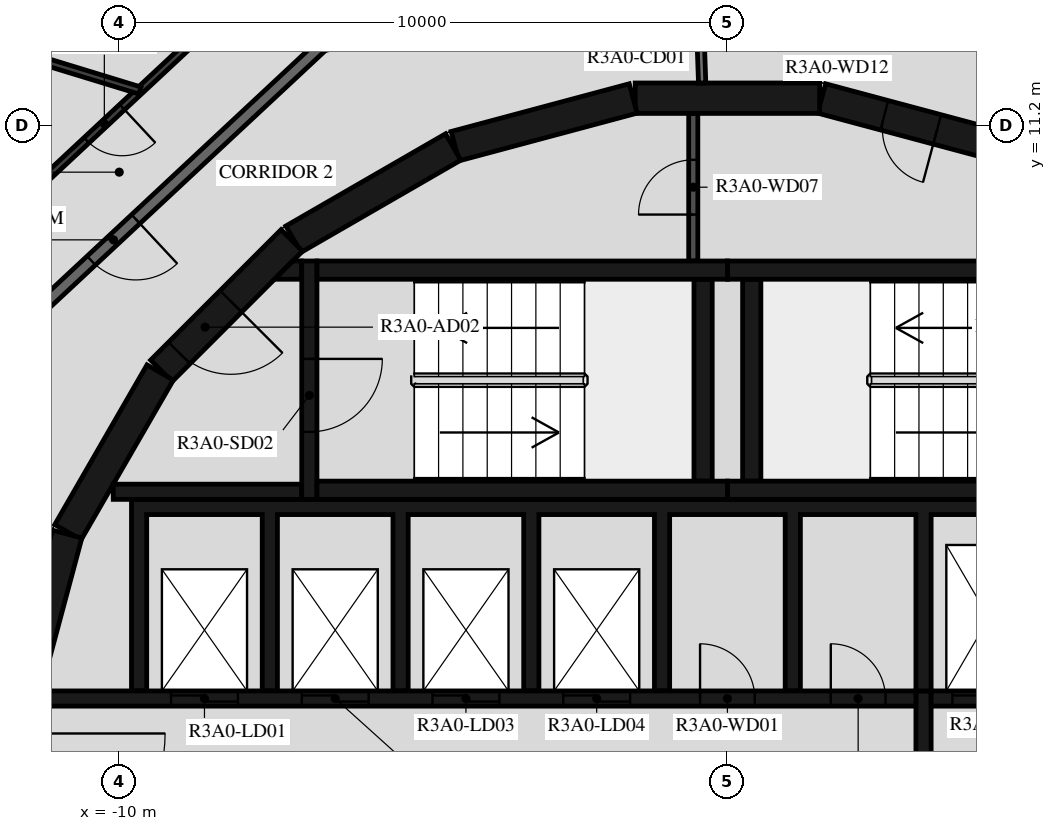
"""IFC4 building model, lengths in metres.
Left out: names, types, materials, properties, quantities, classifications, styles, units other than length and angle.
Written with IfcOpenShell. Run it as: python <this file> out.ifc"""

import sys

from ifc_helpers import new_model, si_unit, direction, frame, frame_2d, origin, place, context, subcontext, project, spatial, polyline, rectangle, outline, extrude, element, fill, save


model = new_model("IFC4")
c1 = context("Model", 3, precision=1e-05, world=origin(), true_north=direction((0.0, 1.0)))
c2 = subcontext(c1, "Body", "Model", "MODEL_VIEW")
j1 = project(units=[si_unit("LENGTHUNIT", "METRE"), si_unit("PLANEANGLEUNIT", "RADIAN")], contexts=[c1])
p1 = place(None, origin())
s1 = spatial("IfcSite", under=j1, at=p1, CompositionType="ELEMENT")
p2 = place(p1, origin())
s2 = spatial("IfcBuilding", under=s1, at=p2, CompositionType="ELEMENT")
p3 = place(p2, frame((0.0, 0.0, 113.4)))
s3 = spatial("IfcBuildingStorey", under=s2, at=p3, CompositionType="ELEMENT", Elevation=113.4)
p4 = place(p3, frame((4.479, 10.858, 0.0), z_axis=(0.0, 0.0, 1.0), x_axis=(-0.965948410781, 0.258734743916, 0.0)))
e1 = element("IfcWall", 1, at=p4, inside=s3, PredefinedType="SHEAR", context=c2, shape_type="SweptSolid", body=[
    extrude(rectangle(XDim=3.033, YDim=0.5, at=frame_2d((1.516, 0.0))), origin(), (0.0, 0.0, 1.0), 3.12),
])
p5 = place(p4, frame((1.066, 0.0, 0.0)))
e2 = element("IfcOpeningElement", 2, at=p5, cuts=e1, PredefinedType="OPENING", context=c2, shape_type="SweptSolid", body=[
    extrude(rectangle(XDim=0.9, YDim=2.1, at=frame_2d((0.45, 1.05))), frame((0.0, 0.26, 0.0), z_axis=(0.0, -1.0, 0.0), x_axis=(1.0, 0.0, 0.0)), (0.0, 0.0, 1.0), 0.52),
])
for number, where, z_axis, x_axis in (
    (3, (1.516, 11.647, 0.0), (0.0, 0.0, 1.0), (-1.0, 0.0, 0.0)),
    (4, (-1.55, 11.643, 0.0), (0.0, 0.0, 1.0), (-0.966, -0.259, 0.0)),
    (5, (-4.51, 10.845, 0.0), (0.0, 0.0, 1.0), (-0.866, -0.5, 0.0)),
):
    element("IfcWall", number, at=place(p3, frame(where, z_axis=z_axis, x_axis=x_axis)), inside=s3, PredefinedType="SHEAR", context=c2, shape_type="SweptSolid", body=[
        extrude(rectangle(XDim=3.033, YDim=0.5, at=frame_2d((1.516, 0.0))), origin(), (0.0, 0.0, 1.0), 3.12),
    ])
p6 = place(p3, frame((-7.164, 9.308, 0.0), z_axis=(0.0, 0.0, 1.0), x_axis=(-0.707106781187, -0.707106781187, 0.0)))
e6 = element("IfcWall", 6, at=p6, inside=s3, PredefinedType="SHEAR", context=c2, shape_type="SweptSolid", body=[
    extrude(rectangle(XDim=3.032, YDim=0.5, at=frame_2d((1.516, 0.0))), origin(), (0.0, 0.0, 1.0), 3.12),
])
p7 = place(p6, frame((1.416, 0.0, 0.0)))
e7 = element("IfcOpeningElement", 7, at=p7, cuts=e6, PredefinedType="OPENING", context=c2, shape_type="SweptSolid", body=[
    extrude(rectangle(XDim=1.2, YDim=2.1, at=frame_2d((0.6, 1.05))), frame((0.0, 0.26, 0.0), z_axis=(0.0, -1.0, 0.0), x_axis=(1.0, 0.0, 0.0)), (0.0, 0.0, 1.0), 0.52),
])
for number, where, z_axis, x_axis in (
    (8, (-9.329, 7.137, 0.0), (0.0, 0.0, 1.0), (-0.5, -0.866, 0.0)),
    (9, (-10.858, 4.479, 0.0), (0.0, 0.0, 1.0), (-0.259, -0.966, 0.0)),
):
    element("IfcWall", number, at=place(p3, frame(where, z_axis=z_axis, x_axis=x_axis)), inside=s3, PredefinedType="SHEAR", context=c2, shape_type="SweptSolid", body=[
        extrude(rectangle(XDim=3.033, YDim=0.5, at=frame_2d((1.516, 0.0))), origin(), (0.0, 0.0, 1.0), 3.12),
    ])
for number, where, z_axis, x_axis in (
    (10, (0.0, 5.2, 0.0), (0.0, 0.0, 1.0), (1.0, 0.0, 0.0)),
    (11, (0.0, 8.82, 0.0), (0.0, 0.0, 1.0), (1.0, 0.0, 0.0)),
):
    element("IfcWall", number, at=place(p3, frame(where, z_axis=z_axis, x_axis=x_axis)), inside=s3, PredefinedType="SHEAR", context=c2, shape_type="SweptSolid", body=[
        extrude(rectangle(XDim=6.75, YDim=0.3, at=frame_2d((3.375, 0.0))), origin(), (0.0, 0.0, 1.0), 3.12),
    ])
p8 = place(p3, frame((0.4, 5.35, 0.0), z_axis=(0.0, 0.0, 1.0), x_axis=(0.0, 1.0, 0.0)))
e12 = element("IfcWall", 12, at=p8, inside=s3, PredefinedType="SHEAR", context=c2, shape_type="SweptSolid", body=[
    extrude(rectangle(XDim=3.32, YDim=0.3, at=frame_2d((1.66, 0.0))), origin(), (0.0, 0.0, 1.0), 3.12),
])
for number, where, z_axis, x_axis in (
    (13, (-6.75, 5.2, 0.0), (0.0, 0.0, 1.0), (1.0, 0.0, 0.0)),
    (14, (-6.75, 8.82, 0.0), (0.0, 0.0, 1.0), (1.0, 0.0, 0.0)),
):
    element("IfcWall", number, at=place(p3, frame(where, z_axis=z_axis, x_axis=x_axis)), inside=s3, PredefinedType="SHEAR", context=c2, shape_type="SweptSolid", body=[
        extrude(rectangle(XDim=6.75, YDim=0.3, at=frame_2d((3.375, 0.0))), origin(), (0.0, 0.0, 1.0), 3.12),
    ])
p9 = place(p3, frame((-0.4, 5.35, 0.0), z_axis=(0.0, 0.0, 1.0), x_axis=(0.0, 1.0, 0.0)))
e15 = element("IfcWall", 15, at=p9, inside=s3, PredefinedType="SHEAR", context=c2, shape_type="SweptSolid", body=[
    extrude(rectangle(XDim=3.32, YDim=0.3, at=frame_2d((1.66, 0.0))), origin(), (0.0, 0.0, 1.0), 3.12),
])
p10 = place(p3, frame((-6.875, 8.97, 0.0), z_axis=(0.0, 0.0, 1.0), x_axis=(0.0, -1.0, 0.0)))
e16 = element("IfcWall", 16, at=p10, inside=s3, PredefinedType="SHEAR", context=c2, shape_type="SweptSolid", body=[
    extrude(rectangle(XDim=3.92, YDim=0.25, at=frame_2d((1.96, 0.0))), origin(), (0.0, 0.0, 1.0), 3.12),
])
p11 = place(p10, frame((1.61, 0.0, 0.0)))
e17 = element("IfcOpeningElement", 17, at=p11, cuts=e16, PredefinedType="OPENING", context=c2, shape_type="SweptSolid", body=[
    extrude(rectangle(XDim=1.2, YDim=2.1, at=frame_2d((0.6, 1.05))), frame((0.0, 0.135, 0.0), z_axis=(0.0, -1.0, 0.0), x_axis=(1.0, 0.0, 0.0)), (0.0, 0.0, 1.0), 0.27),
])
p12 = place(p3, frame((-7.0, 5.175, 0.0), z_axis=(0.0, 0.0, 1.0), x_axis=(-1.0, 0.0, 0.0)))
e18 = element("IfcWall", 18, at=p12, inside=s3, PredefinedType="SHEAR", context=c2, shape_type="SweptSolid", body=[
    extrude(rectangle(XDim=3.1, YDim=0.25, at=frame_2d((1.55, 0.0))), origin(), (0.0, 0.0, 1.0), 3.12),
])
p13 = place(p3, origin())
e19 = element("IfcWall", 19, at=p13, inside=s3, PredefinedType="SHEAR", context=c2, shape_type="SweptSolid", body=[
    extrude(outline(polyline([(-7.148, 8.97), (-7.0, 8.97), (-7.0, 8.67), (-7.448, 8.67), (-7.148, 8.97)])), origin(), (0.0, 0.0, 1.0), 3.12),
])
p14 = place(p3, origin())
e20 = element("IfcWall", 20, at=p14, inside=s3, PredefinedType="SHEAR", context=c2, shape_type="SweptSolid", body=[
    extrude(outline(polyline([(-9.55, 4.8), (-7.65, 4.8), (-7.65, 1.9), (-7.4, 1.9), (-7.4, 4.8), (-5.5, 4.8), (-5.5, 1.9), (-5.25, 1.9), (-5.25, 4.8), (-3.35, 4.8), (-3.35, 1.9), (-3.1, 1.9), (-3.1, 4.8), (-1.2, 4.8), (-1.2, 1.9), (-0.95, 1.9), (-0.95, 4.8), (0.95, 4.8), (0.95, 1.9), (1.2, 1.9), (1.2, 4.8), (3.1, 4.8), (3.1, 1.9), (3.35, 1.9), (3.35, 4.8), (5.25, 4.8), (5.25, 1.9), (5.5, 1.9), (5.5, 4.8), (7.4, 4.8), (7.4, 1.9), (7.65, 1.9), (7.65, 4.8), (9.55, 4.8), (9.55, 1.9), (9.8, 1.9), (9.8, 4.8), (9.8, 5.05), (-9.8, 5.05), (-9.8, 4.8), (-9.8, 1.9), (-9.55, 1.9), (-9.55, 4.8)])), origin(), (0.0, 0.0, 1.0), 3.12),
])
p15 = place(p3, frame((-11.28, 1.775, 0.0), z_axis=(0.0, 0.0, 1.0), x_axis=(1.0, 0.0, 0.0)))
e21 = element("IfcWall", 21, at=p15, inside=s3, PredefinedType="SHEAR", context=c2, shape_type="SweptSolid", body=[
    extrude(rectangle(XDim=14.38, YDim=0.25, at=frame_2d((7.19, 0.0))), origin(), (0.0, 0.0, 1.0), 3.12),
])
p16 = place(p15, frame((2.13, 0.0, 0.0)))
e22 = element("IfcOpeningElement", 22, at=p16, cuts=e21, PredefinedType="OPENING", context=c2, shape_type="SweptSolid", body=[
    extrude(rectangle(XDim=1.1, YDim=2.1, at=frame_2d((0.55, 1.05))), frame((0.0, 0.135, 0.0), z_axis=(0.0, -1.0, 0.0), x_axis=(1.0, 0.0, 0.0)), (0.0, 0.0, 1.0), 0.27),
])
p17 = place(p15, frame((4.28, 0.0, 0.0)))
e23 = element("IfcOpeningElement", 23, at=p17, cuts=e21, PredefinedType="OPENING", context=c2, shape_type="SweptSolid", body=[
    extrude(rectangle(XDim=1.1, YDim=2.1, at=frame_2d((0.55, 1.05))), frame((0.0, 0.135, 0.0), z_axis=(0.0, -1.0, 0.0), x_axis=(1.0, 0.0, 0.0)), (0.0, 0.0, 1.0), 0.27),
])
p18 = place(p15, frame((6.43, 0.0, 0.0)))
e24 = element("IfcOpeningElement", 24, at=p18, cuts=e21, PredefinedType="OPENING", context=c2, shape_type="SweptSolid", body=[
    extrude(rectangle(XDim=1.1, YDim=2.1, at=frame_2d((0.55, 1.05))), frame((0.0, 0.135, 0.0), z_axis=(0.0, -1.0, 0.0), x_axis=(1.0, 0.0, 0.0)), (0.0, 0.0, 1.0), 0.27),
])
p19 = place(p15, frame((8.58, 0.0, 0.0)))
e25 = element("IfcOpeningElement", 25, at=p19, cuts=e21, PredefinedType="OPENING", context=c2, shape_type="SweptSolid", body=[
    extrude(rectangle(XDim=1.1, YDim=2.1, at=frame_2d((0.55, 1.05))), frame((0.0, 0.135, 0.0), z_axis=(0.0, -1.0, 0.0), x_axis=(1.0, 0.0, 0.0)), (0.0, 0.0, 1.0), 0.27),
])
p20 = place(p15, frame((10.83, 0.0, 0.0)))
e26 = element("IfcOpeningElement", 26, at=p20, cuts=e21, PredefinedType="OPENING", context=c2, shape_type="SweptSolid", body=[
    extrude(rectangle(XDim=0.9, YDim=2.1, at=frame_2d((0.45, 1.05))), frame((0.0, 0.135, 0.0), z_axis=(0.0, -1.0, 0.0), x_axis=(1.0, 0.0, 0.0)), (0.0, 0.0, 1.0), 0.27),
])
p21 = place(p15, frame((12.98, 0.0, 0.0)))
e27 = element("IfcOpeningElement", 27, at=p21, cuts=e21, PredefinedType="OPENING", context=c2, shape_type="SweptSolid", body=[
    extrude(rectangle(XDim=0.9, YDim=2.1, at=frame_2d((0.45, 1.05))), frame((0.0, 0.135, 0.0), z_axis=(0.0, -1.0, 0.0), x_axis=(1.0, 0.0, 0.0)), (0.0, 0.0, 1.0), 0.27),
])
p22 = place(p3, frame((3.35, 1.775, 0.0), z_axis=(0.0, 0.0, 1.0), x_axis=(1.0, 0.0, 0.0)))
e28 = element("IfcWall", 28, at=p22, inside=s3, PredefinedType="SHEAR", context=c2, shape_type="SweptSolid", body=[
    extrude(rectangle(XDim=7.93, YDim=0.25, at=frame_2d((3.965, 0.0))), origin(), (0.0, 0.0, 1.0), 3.12),
])
p23 = place(p22, frame((0.35, 0.0, 0.0)))
e29 = element("IfcOpeningElement", 29, at=p23, cuts=e28, PredefinedType="OPENING", context=c2, shape_type="SweptSolid", body=[
    extrude(rectangle(XDim=1.2, YDim=2.4, at=frame_2d((0.6, 1.2))), frame((0.0, 0.135, 0.0), z_axis=(0.0, -1.0, 0.0), x_axis=(1.0, 0.0, 0.0)), (0.0, 0.0, 1.0), 0.27),
])
p24 = place(p22, frame((2.5, 0.0, 0.0)))
e30 = element("IfcOpeningElement", 30, at=p24, cuts=e28, PredefinedType="OPENING", context=c2, shape_type="SweptSolid", body=[
    extrude(rectangle(XDim=1.2, YDim=2.4, at=frame_2d((0.6, 1.2))), frame((0.0, 0.135, 0.0), z_axis=(0.0, -1.0, 0.0), x_axis=(1.0, 0.0, 0.0)), (0.0, 0.0, 1.0), 0.27),
])
p25 = place(p22, frame((4.8, 0.0, 0.0)))
e31 = element("IfcOpeningElement", 31, at=p25, cuts=e28, PredefinedType="OPENING", context=c2, shape_type="SweptSolid", body=[
    extrude(rectangle(XDim=0.9, YDim=2.1, at=frame_2d((0.45, 1.05))), frame((0.0, 0.135, 0.0), z_axis=(0.0, -1.0, 0.0), x_axis=(1.0, 0.0, 0.0)), (0.0, 0.0, 1.0), 0.27),
])
p26 = place(p3, frame((3.225, -1.9, 0.0), z_axis=(0.0, 0.0, 1.0), x_axis=(0.0, 1.0, 0.0)))
e32 = element("IfcWall", 32, at=p26, inside=s3, PredefinedType="SHEAR", context=c2, shape_type="SweptSolid", body=[
    extrude(rectangle(XDim=3.8, YDim=0.25, at=frame_2d((1.9, 0.0))), origin(), (0.0, 0.0, 1.0), 3.12),
])
p27 = place(p3, frame((-0.562, 8.97, 0.0), z_axis=(0.0, 0.0, 1.0), x_axis=(0.0, 1.0, 0.0)))
e33 = element("IfcWall", 33, at=p27, inside=s3, PredefinedType="PARTITIONING", context=c2, shape_type="SweptSolid", body=[
    extrude(rectangle(XDim=2.427, YDim=0.15, at=frame_2d((1.214, 0.0))), origin(), (0.0, 0.0, 1.0), 3.12),
])
p28 = place(p27, frame((0.764, 0.0, 0.0)))
e34 = element("IfcOpeningElement", 34, at=p28, cuts=e33, PredefinedType="OPENING", context=c2, shape_type="SweptSolid", body=[
    extrude(rectangle(XDim=0.9, YDim=2.1, at=frame_2d((0.45, 1.05))), frame((0.0, 0.085, 0.0), z_axis=(0.0, -1.0, 0.0), x_axis=(1.0, 0.0, 0.0)), (0.0, 0.0, 1.0), 0.17),
])
p29 = place(p3, frame((-0.487, 13.948, 0.0), z_axis=(0.0, 0.0, 1.0), x_axis=(0.034859752231, -0.999392214135, 0.0)))
e35 = element("IfcWall", 35, at=p29, inside=s3, PredefinedType="PARTITIONING", context=c2, shape_type="SweptSolid", body=[
    extrude(rectangle(XDim=2.052, YDim=0.12, at=frame_2d((1.026, 0.0))), origin(), (0.0, 0.0, 1.0), 3.12),
])
p30 = place(p29, frame((0.125, 0.0, 0.0)))
e36 = element("IfcOpeningElement", 36, at=p30, cuts=e35, PredefinedType="OPENING", context=c2, shape_type="SweptSolid", body=[
    extrude(rectangle(XDim=1.2, YDim=2.1, at=frame_2d((0.6, 1.05))), frame((0.0, 0.07, 0.0), z_axis=(0.0, -1.0, 0.0), x_axis=(1.0, 0.0, 0.0)), (0.0, 0.0, 1.0), 0.14),
])
p31 = place(p3, frame((7.516, 12.028, 0.0), z_axis=(0.0, 0.0, 1.0), x_axis=(-0.956306642771, 0.292365533182, 0.0)))
e37 = element("IfcWall", 37, at=p31, inside=s3, PredefinedType="STANDARD", context=c2, shape_type="SweptSolid", body=[
    extrude(rectangle(XDim=7.342, YDim=0.2, at=frame_2d((3.671, 0.0))), origin(), (0.0, 0.0, 1.0), 3.12),
])
p32 = place(p3, frame((-6.659, 12.523, 0.0), z_axis=(0.0, 0.0, 1.0), x_axis=(-0.731350455479, -0.682001841105, 0.0)))
e38 = element("IfcWall", 38, at=p32, inside=s3, PredefinedType="STANDARD", context=c2, shape_type="SweptSolid", body=[
    extrude(rectangle(XDim=7.342, YDim=0.2, at=frame_2d((3.671, 0.0))), origin(), (0.0, 0.0, 1.0), 3.12),
])
p33 = place(p32, frame((4.2, 0.0, 0.0)))
e39 = element("IfcOpeningElement", 39, at=p33, cuts=e38, PredefinedType="OPENING", context=c2, shape_type="SweptSolid", body=[
    extrude(rectangle(XDim=1.0, YDim=2.1, at=frame_2d((0.5, 1.05))), frame((0.0, 0.11, 0.0), z_axis=(0.0, -1.0, 0.0), x_axis=(1.0, 0.0, 0.0)), (0.0, 0.0, 1.0), 0.22),
])
p34 = place(p3, frame((-1.539, 24.071, 0.0), z_axis=(0.0, 0.0, 1.0), x_axis=(0.68200220595, -0.731350115252, 0.0)))
e40 = element("IfcWall", 40, at=p34, inside=s3, PredefinedType="PARTITIONING", context=c2, shape_type="SweptSolid", body=[
    extrude(rectangle(XDim=17.316, YDim=0.12, at=frame_2d((8.658, 0.0))), origin(), (0.0, 0.0, 1.0), 3.12),
])
p35 = place(p34, frame((3.323, 0.0, 0.0)))
e41 = element("IfcOpeningElement", 41, at=p35, cuts=e40, PredefinedType="OPENING", context=c2, shape_type="SweptSolid", body=[
    extrude(rectangle(XDim=0.9, YDim=2.1, at=frame_2d((0.45, 1.05))), frame((0.0, 0.07, 0.0), z_axis=(0.0, -1.0, 0.0), x_axis=(1.0, 0.0, 0.0)), (0.0, 0.0, 1.0), 0.14),
])
p36 = place(p34, frame((1.417, 0.0, 0.0)))
e42 = element("IfcOpeningElement", 42, at=p36, cuts=e40, PredefinedType="OPENING", context=c2, shape_type="SweptSolid", body=[
    extrude(rectangle(XDim=0.9, YDim=2.1, at=frame_2d((0.45, 1.05))), frame((0.0, 0.07, 0.0), z_axis=(0.0, -1.0, 0.0), x_axis=(1.0, 0.0, 0.0)), (0.0, 0.0, 1.0), 0.14),
])
p37 = place(p3, frame((-7.388, 13.894, 0.0), z_axis=(0.0, 0.0, 1.0), x_axis=(-0.731357186721, -0.681994622729, 0.0)))
e43 = element("IfcWall", 43, at=p37, inside=s3, PredefinedType="PARTITIONING", context=c2, shape_type="SweptSolid", body=[
    extrude(rectangle(XDim=8.146, YDim=0.12, at=frame_2d((4.073, 0.0))), origin(), (0.0, 0.0, 1.0), 3.12),
])
p38 = place(p37, frame((3.509, 0.0, 0.0)))
e44 = element("IfcOpeningElement", 44, at=p38, cuts=e43, PredefinedType="OPENING", context=c2, shape_type="SweptSolid", body=[
    extrude(rectangle(XDim=0.8, YDim=2.1, at=frame_2d((0.4, 1.05))), frame((0.0, 0.07, 0.0), z_axis=(0.0, -1.0, 0.0), x_axis=(1.0, 0.0, 0.0)), (0.0, 0.0, 1.0), 0.14),
])
p39 = place(p3, frame((-9.169, 22.31, 0.0), z_axis=(0.0, 0.0, 1.0), x_axis=(-0.29236145486, -0.956307889601, 0.0)))
e45 = element("IfcWall", 45, at=p39, inside=s3, PredefinedType="PARTITIONING", context=c2, shape_type="SweptSolid", body=[
    extrude(rectangle(XDim=17.316, YDim=0.12, at=frame_2d((8.658, 0.0))), origin(), (0.0, 0.0, 1.0), 3.12),
])
p40 = place(p39, frame((3.683, 0.0, 0.0)))
e46 = element("IfcOpeningElement", 46, at=p40, cuts=e45, PredefinedType="OPENING", context=c2, shape_type="SweptSolid", body=[
    extrude(rectangle(XDim=0.9, YDim=2.1, at=frame_2d((0.45, 1.05))), frame((0.0, 0.07, 0.0), z_axis=(0.0, -1.0, 0.0), x_axis=(1.0, 0.0, 0.0)), (0.0, 0.0, 1.0), 0.14),
])
p41 = place(p3, frame((-12.157, 12.537, 0.0), z_axis=(0.0, 0.0, 1.0), x_axis=(0.956293441844, -0.292408708979, 0.0)))
e47 = element("IfcWall", 47, at=p41, inside=s3, PredefinedType="PARTITIONING", context=c2, shape_type="SweptSolid", body=[
    extrude(rectangle(XDim=2.609, YDim=0.12, at=frame_2d((1.305, 0.0))), origin(), (0.0, 0.0, 1.0), 3.12),
])
p42 = place(p11, origin())
e48 = element("IfcDoor", 48, at=p42, inside=s3, OperationType="SINGLE_SWING_LEFT", PredefinedType="DOOR", context=c2, shape_type="SweptSolid", body=[
    extrude(rectangle(XDim=1.2, YDim=2.1, at=frame_2d((0.6, 1.05))), frame((0.0, 0.025, 0.0), z_axis=(0.0, -1.0, 0.0), x_axis=(1.0, 0.0, 0.0)), (0.0, 0.0, 1.0), 0.05),
])
fill(e17, e48)
p43 = place(p7, origin())
e49 = element("IfcDoor", 49, at=p43, inside=s3, OperationType="SINGLE_SWING_RIGHT", PredefinedType="DOOR", context=c2, shape_type="SweptSolid", body=[
    extrude(rectangle(XDim=1.2, YDim=2.1, at=frame_2d((0.6, 1.05))), frame((0.0, 0.025, 0.0), z_axis=(0.0, -1.0, 0.0), x_axis=(1.0, 0.0, 0.0)), (0.0, 0.0, 1.0), 0.05),
])
fill(e7, e49)
p44 = place(p16, origin())
e50 = element("IfcDoor", 50, at=p44, inside=s3, OperationType="DOUBLE_DOOR_SLIDING", PredefinedType="DOOR", context=c2, shape_type="SweptSolid", body=[
    extrude(rectangle(XDim=1.1, YDim=2.1, at=frame_2d((0.55, 1.05))), frame((0.0, 0.025, 0.0), z_axis=(0.0, -1.0, 0.0), x_axis=(1.0, 0.0, 0.0)), (0.0, 0.0, 1.0), 0.05),
])
fill(e22, e50)
p45 = place(p17, origin())
e51 = element("IfcDoor", 51, at=p45, inside=s3, OperationType="DOUBLE_DOOR_SLIDING", PredefinedType="DOOR", context=c2, shape_type="SweptSolid", body=[
    extrude(rectangle(XDim=1.1, YDim=2.1, at=frame_2d((0.55, 1.05))), frame((0.0, 0.025, 0.0), z_axis=(0.0, -1.0, 0.0), x_axis=(1.0, 0.0, 0.0)), (0.0, 0.0, 1.0), 0.05),
])
fill(e23, e51)
p46 = place(p18, origin())
e52 = element("IfcDoor", 52, at=p46, inside=s3, OperationType="DOUBLE_DOOR_SLIDING", PredefinedType="DOOR", context=c2, shape_type="SweptSolid", body=[
    extrude(rectangle(XDim=1.1, YDim=2.1, at=frame_2d((0.55, 1.05))), frame((0.0, 0.025, 0.0), z_axis=(0.0, -1.0, 0.0), x_axis=(1.0, 0.0, 0.0)), (0.0, 0.0, 1.0), 0.05),
])
fill(e24, e52)
p47 = place(p19, origin())
e53 = element("IfcDoor", 53, at=p47, inside=s3, OperationType="DOUBLE_DOOR_SLIDING", PredefinedType="DOOR", context=c2, shape_type="SweptSolid", body=[
    extrude(rectangle(XDim=1.1, YDim=2.1, at=frame_2d((0.55, 1.05))), frame((0.0, 0.025, 0.0), z_axis=(0.0, -1.0, 0.0), x_axis=(1.0, 0.0, 0.0)), (0.0, 0.0, 1.0), 0.05),
])
fill(e25, e53)
p48 = place(p23, origin())
e54 = element("IfcDoor", 54, at=p48, inside=s3, OperationType="DOUBLE_DOOR_SLIDING", PredefinedType="DOOR", context=c2, shape_type="SweptSolid", body=[
    extrude(rectangle(XDim=1.2, YDim=2.4, at=frame_2d((0.6, 1.2))), frame((0.0, 0.025, 0.0), z_axis=(0.0, -1.0, 0.0), x_axis=(1.0, 0.0, 0.0)), (0.0, 0.0, 1.0), 0.05),
])
fill(e29, e54)
p49 = place(p20, origin())
e55 = element("IfcDoor", 55, at=p49, inside=s3, OperationType="SINGLE_SWING_RIGHT", PredefinedType="DOOR", context=c2, shape_type="SweptSolid", body=[
    extrude(rectangle(XDim=0.9, YDim=2.1, at=frame_2d((0.45, 1.05))), frame((0.0, 0.025, 0.0), z_axis=(0.0, -1.0, 0.0), x_axis=(1.0, 0.0, 0.0)), (0.0, 0.0, 1.0), 0.05),
])
fill(e26, e55)
p50 = place(p21, origin())
e56 = element("IfcDoor", 56, at=p50, inside=s3, OperationType="SINGLE_SWING_LEFT", PredefinedType="DOOR", context=c2, shape_type="SweptSolid", body=[
    extrude(rectangle(XDim=0.9, YDim=2.1, at=frame_2d((0.45, 1.05))), frame((0.0, 0.025, 0.0), z_axis=(0.0, -1.0, 0.0), x_axis=(1.0, 0.0, 0.0)), (0.0, 0.0, 1.0), 0.05),
])
fill(e27, e56)
p51 = place(p28, origin())
e57 = element("IfcDoor", 57, at=p51, inside=s3, OperationType="SINGLE_SWING_RIGHT", PredefinedType="DOOR", context=c2, shape_type="SweptSolid", body=[
    extrude(rectangle(XDim=0.9, YDim=2.1, at=frame_2d((0.45, 1.05))), frame((0.0, 0.025, 0.0), z_axis=(0.0, -1.0, 0.0), x_axis=(1.0, 0.0, 0.0)), (0.0, 0.0, 1.0), 0.05),
])
fill(e34, e57)
p52 = place(p5, origin())
e58 = element("IfcDoor", 58, at=p52, inside=s3, OperationType="SINGLE_SWING_LEFT", PredefinedType="DOOR", context=c2, shape_type="SweptSolid", body=[
    extrude(rectangle(XDim=0.9, YDim=2.1, at=frame_2d((0.45, 1.05))), frame((0.0, 0.025, 0.0), z_axis=(0.0, -1.0, 0.0), x_axis=(1.0, 0.0, 0.0)), (0.0, 0.0, 1.0), 0.05),
])
fill(e2, e58)
p53 = place(p33, origin())
e59 = element("IfcDoor", 59, at=p53, inside=s3, OperationType="SINGLE_SWING_LEFT", PredefinedType="DOOR", context=c2, shape_type="SweptSolid", body=[
    extrude(rectangle(XDim=1.0, YDim=2.1, at=frame_2d((0.5, 1.05))), frame((0.0, 0.025, 0.0), z_axis=(0.0, -1.0, 0.0), x_axis=(1.0, 0.0, 0.0)), (0.0, 0.0, 1.0), 0.05),
])
fill(e39, e59)
p54 = place(p38, origin())
e60 = element("IfcDoor", 60, at=p54, inside=s3, OperationType="SINGLE_SWING_LEFT", PredefinedType="DOOR", context=c2, shape_type="SweptSolid", body=[
    extrude(rectangle(XDim=0.8, YDim=2.1, at=frame_2d((0.4, 1.05))), frame((0.0, 0.025, 0.0), z_axis=(0.0, -1.0, 0.0), x_axis=(1.0, 0.0, 0.0)), (0.0, 0.0, 1.0), 0.05),
])
fill(e44, e60)
save(model, sys.argv[1])
